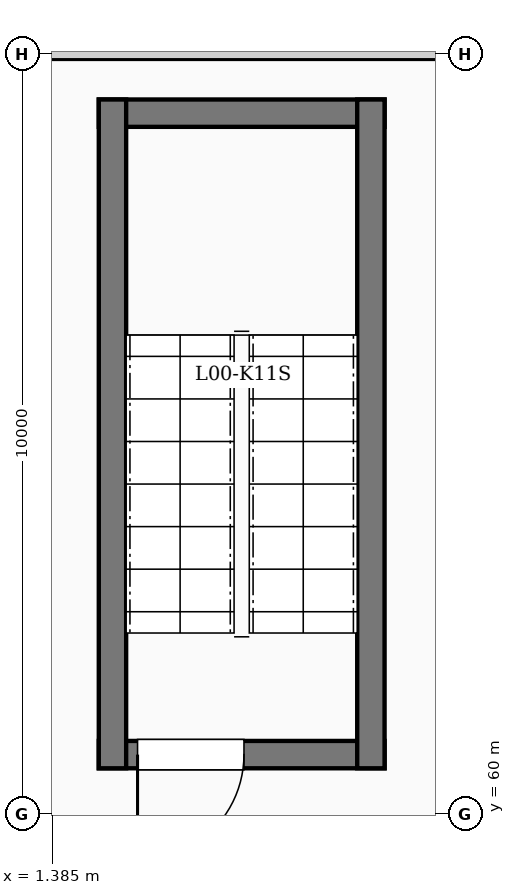
"""IFC4 building model, lengths in metres.
Left out: names, types, materials, properties, quantities, classifications, styles, units other than length and angle.
Written with IfcOpenShell. Run it as: python <this file> out.ifc"""

import sys

from ifc_helpers import new_model, si_unit, direction, frame, frame_2d, origin, place, context, subcontext, project, spatial, rectangle, extrude, element, fill, save


model = new_model("IFC4")
c1 = context("Model", 3, precision=1e-05, world=origin(), true_north=direction((0.0, 1.0)))
c2 = subcontext(c1, "Body", "Model", "MODEL_VIEW")
j1 = project(units=[si_unit("LENGTHUNIT", "METRE"), si_unit("PLANEANGLEUNIT", "RADIAN")], contexts=[c1])
p1 = place(None, origin())
s1 = spatial("IfcSite", under=j1, at=p1, CompositionType="ELEMENT")
p2 = place(p1, origin())
s2 = spatial("IfcBuilding", under=s1, at=p2, CompositionType="ELEMENT")
p3 = place(p2, origin())
s3 = spatial("IfcBuildingStorey", under=s2, at=p3, CompositionType="ELEMENT", Elevation=0.0)
p4 = place(p3, frame((2.0, 60.78, 0.0), z_axis=(0.0, 0.0, 1.0), x_axis=(1.0, 0.0, 0.0)))
e1 = element("IfcWall", 1, at=p4, inside=s3, PredefinedType="SHEAR", context=c2, shape_type="SweptSolid", body=[
    extrude(rectangle(XDim=3.76, YDim=0.36, at=frame_2d((1.88, 0.0))), origin(), (0.0, 0.0, 1.0), 5.4),
])
p5 = place(p4, frame((0.51, 0.0, 0.0)))
e2 = element("IfcOpeningElement", 2, at=p5, cuts=e1, PredefinedType="OPENING", context=c2, shape_type="SweptSolid", body=[
    extrude(rectangle(XDim=1.4, YDim=2.35, at=frame_2d((0.7, 1.175))), frame((0.0, 0.19, 0.0), z_axis=(0.0, -1.0, 0.0), x_axis=(1.0, 0.0, 0.0)), (0.0, 0.0, 1.0), 0.38),
])
p6 = place(p3, frame((2.0, 69.22, 0.0), z_axis=(0.0, 0.0, 1.0), x_axis=(1.0, 0.0, 0.0)))
e3 = element("IfcWall", 3, at=p6, inside=s3, PredefinedType="SHEAR", context=c2, shape_type="SweptSolid", body=[
    extrude(rectangle(XDim=3.76, YDim=0.36, at=frame_2d((1.88, 0.0))), origin(), (0.0, 0.0, 1.0), 5.4),
])
for number, where, z_axis, x_axis in (
    (4, (2.18, 60.6, 0.0), (0.0, 0.0, 1.0), (0.0, 1.0, 0.0)),
    (5, (5.58, 60.6, 0.0), (0.0, 0.0, 1.0), (0.0, 1.0, 0.0)),
):
    element("IfcWall", number, at=place(p3, frame(where, z_axis=z_axis, x_axis=x_axis)), inside=s3, PredefinedType="SHEAR", context=c2, shape_type="SweptSolid", body=[
        extrude(rectangle(XDim=8.8, YDim=0.36, at=frame_2d((4.4, 0.0))), origin(), (0.0, 0.0, 1.0), 5.4),
    ])
p7 = place(p3, frame((0.8, 70.0, 0.0), z_axis=(0.0, 0.0, 1.0), x_axis=(1.0, 0.0, 0.0)))
e6 = element("IfcWall", 6, at=p7, inside=s3, PredefinedType="PARTITIONING", context=c2, shape_type="SweptSolid", body=[
    extrude(rectangle(XDim=8.6, YDim=0.15, at=frame_2d((4.3, 0.0))), origin(), (0.0, 0.0, 1.0), 4.59),
])
p8 = place(p5, origin())
e7 = element("IfcDoor", 7, at=p8, inside=s3, OperationType="SINGLE_SWING_LEFT", PredefinedType="DOOR", context=c2, shape_type="SweptSolid", body=[
    extrude(rectangle(XDim=1.4, YDim=2.35, at=frame_2d((0.7, 1.175))), frame((0.0, 0.025, 0.0), z_axis=(0.0, -1.0, 0.0), x_axis=(1.0, 0.0, 0.0)), (0.0, 0.0, 1.0), 0.05),
])
fill(e2, e7)
save(model, sys.argv[1])
